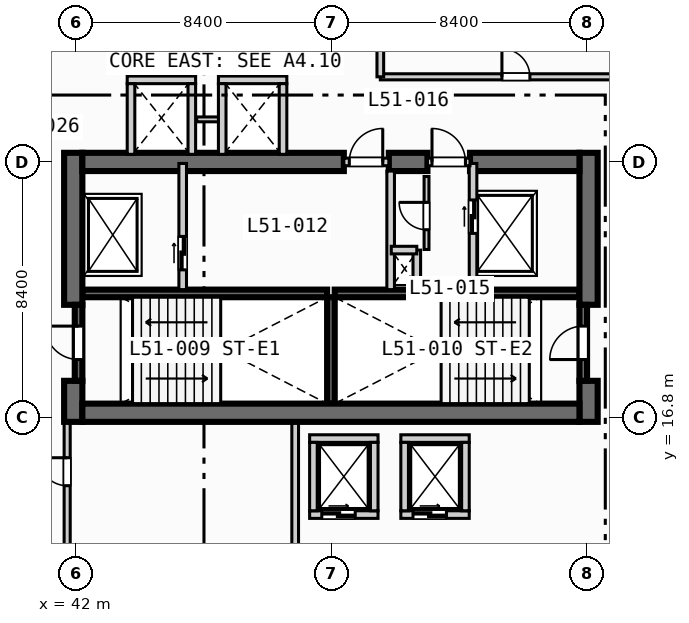
"""IFC4 building model, lengths in metres.
Left out: names, types, materials, properties, quantities, classifications, styles, units other than length and angle.
Written with IfcOpenShell. Run it as: python <this file> out.ifc"""

import sys

from ifc_helpers import new_model, si_unit, direction, frame, frame_2d, origin, place, context, subcontext, project, spatial, rectangle, extrude, element, fill, save


model = new_model("IFC4")
c1 = context("Model", 3, precision=1e-05, world=origin(), true_north=direction((0.0, 1.0)))
c2 = subcontext(c1, "Body", "Model", "MODEL_VIEW")
j1 = project(units=[si_unit("LENGTHUNIT", "METRE"), si_unit("PLANEANGLEUNIT", "RADIAN")], contexts=[c1])
p1 = place(None, origin())
s1 = spatial("IfcSite", under=j1, at=p1, CompositionType="ELEMENT")
p2 = place(p1, origin())
s2 = spatial("IfcBuilding", under=s1, at=p2, CompositionType="ELEMENT")
p3 = place(p2, frame((0.0, 0.0, 208.7)))
s3 = spatial("IfcBuildingStorey", under=s2, at=p3, CompositionType="ELEMENT", Elevation=208.7)
for number, where, z_axis, x_axis in (
    (1, (42.2, 20.875, 0.0), (0.0, 0.0, 1.0), (1.0, 0.0, 0.0)),
    (2, (50.5, 20.875, 0.0), (0.0, 0.0, 1.0), (1.0, 0.0, 0.0)),
):
    element("IfcWall", number, at=place(p3, frame(where, z_axis=z_axis, x_axis=x_axis)), inside=s3, PredefinedType="SOLIDWALL", context=c2, shape_type="SweptSolid", body=[
        extrude(rectangle(XDim=8.05, YDim=0.25, at=frame_2d((4.025, 0.0))), origin(), (0.0, 0.0, 1.0), 3.47),
    ])
p4 = place(p3, frame((50.375, 17.25, 0.0), z_axis=(0.0, 0.0, 1.0), x_axis=(0.0, 1.0, 0.0)))
e3 = element("IfcWall", 3, at=p4, inside=s3, PredefinedType="SOLIDWALL", context=c2, shape_type="SweptSolid", body=[
    extrude(rectangle(XDim=3.5, YDim=0.25, at=frame_2d((1.75, 0.0))), origin(), (0.0, 0.0, 1.0), 3.47),
])
p5 = place(p3, frame((41.9, 16.65, 0.0), z_axis=(0.0, 0.0, 1.0), x_axis=(0.0, 1.0, 0.0)))
e4 = element("IfcWall", 4, at=p5, inside=s3, PredefinedType="SHEAR", context=c2, shape_type="SweptSolid", body=[
    extrude(rectangle(XDim=1.35, YDim=0.6, at=frame_2d((0.675, 0.0))), origin(), (0.0, 0.0, 1.0), 3.47),
])
p6 = place(p3, frame((41.9, 20.5, 0.0), z_axis=(0.0, 0.0, 1.0), x_axis=(0.0, 1.0, 0.0)))
e5 = element("IfcWall", 5, at=p6, inside=s3, PredefinedType="SHEAR", context=c2, shape_type="SweptSolid", body=[
    extrude(rectangle(XDim=5.0, YDim=0.6, at=frame_2d((2.5, 0.0))), origin(), (0.0, 0.0, 1.0), 3.47),
])
p7 = place(p3, frame((58.85, 16.65, 0.0), z_axis=(0.0, 0.0, 1.0), x_axis=(0.0, 1.0, 0.0)))
e6 = element("IfcWall", 6, at=p7, inside=s3, PredefinedType="SHEAR", context=c2, shape_type="SweptSolid", body=[
    extrude(rectangle(XDim=1.35, YDim=0.6, at=frame_2d((0.675, 0.0))), origin(), (0.0, 0.0, 1.0), 3.47),
])
p8 = place(p3, frame((58.85, 20.5, 0.0), z_axis=(0.0, 0.0, 1.0), x_axis=(0.0, 1.0, 0.0)))
e7 = element("IfcWall", 7, at=p8, inside=s3, PredefinedType="SHEAR", context=c2, shape_type="SweptSolid", body=[
    extrude(rectangle(XDim=5.0, YDim=0.6, at=frame_2d((2.5, 0.0))), origin(), (0.0, 0.0, 1.0), 3.47),
])
p9 = place(p3, frame((42.2, 16.95, 0.0), z_axis=(0.0, 0.0, 1.0), x_axis=(1.0, 0.0, 0.0)))
e8 = element("IfcWall", 8, at=p9, inside=s3, PredefinedType="SHEAR", context=c2, shape_type="SweptSolid", body=[
    extrude(rectangle(XDim=16.35, YDim=0.6, at=frame_2d((8.175, 0.0))), origin(), (0.0, 0.0, 1.0), 3.47),
])
p10 = place(p3, frame((42.2, 25.2, 0.0), z_axis=(0.0, 0.0, 1.0), x_axis=(1.0, 0.0, 0.0)))
e9 = element("IfcWall", 9, at=p10, inside=s3, PredefinedType="SHEAR", context=c2, shape_type="SweptSolid", body=[
    extrude(rectangle(XDim=8.6, YDim=0.6, at=frame_2d((4.3, 0.0))), origin(), (0.0, 0.0, 1.0), 3.47),
])
p11 = place(p3, frame((52.28, 25.2, 0.0), z_axis=(0.0, 0.0, 1.0), x_axis=(1.0, 0.0, 0.0)))
e10 = element("IfcWall", 10, at=p11, inside=s3, PredefinedType="SHEAR", context=c2, shape_type="SweptSolid", body=[
    extrude(rectangle(XDim=1.27, YDim=0.6, at=frame_2d((0.635, 0.0))), origin(), (0.0, 0.0, 1.0), 3.47),
])
p12 = place(p3, frame((54.95, 25.2, 0.0), z_axis=(0.0, 0.0, 1.0), x_axis=(1.0, 0.0, 0.0)))
e11 = element("IfcWall", 11, at=p12, inside=s3, PredefinedType="SHEAR", context=c2, shape_type="SweptSolid", body=[
    extrude(rectangle(XDim=3.6, YDim=0.6, at=frame_2d((1.8, 0.0))), origin(), (0.0, 0.0, 1.0), 3.47),
])
p13 = place(p3, frame((42.075, 18.0, 0.0), z_axis=(0.0, 0.0, 1.0), x_axis=(0.0, 1.0, 0.0)))
e12 = element("IfcWall", 12, at=p13, inside=s3, PredefinedType="SOLIDWALL", context=c2, shape_type="SweptSolid", body=[
    extrude(rectangle(XDim=2.5, YDim=0.25, at=frame_2d((1.25, 0.0))), origin(), (0.0, 0.0, 1.0), 3.47),
])
p14 = place(p13, frame((0.7, 0.0, 0.0)))
e13 = element("IfcOpeningElement", 13, at=p14, cuts=e12, PredefinedType="OPENING", context=c2, shape_type="SweptSolid", body=[
    extrude(rectangle(XDim=1.1, YDim=2.15, at=frame_2d((0.55, 1.075))), frame((0.0, 0.135, 0.0), z_axis=(0.0, -1.0, 0.0), x_axis=(1.0, 0.0, 0.0)), (0.0, 0.0, 1.0), 0.27),
])
p15 = place(p3, frame((58.675, 18.0, 0.0), z_axis=(0.0, 0.0, 1.0), x_axis=(0.0, 1.0, 0.0)))
e14 = element("IfcWall", 14, at=p15, inside=s3, PredefinedType="SOLIDWALL", context=c2, shape_type="SweptSolid", body=[
    extrude(rectangle(XDim=2.5, YDim=0.25, at=frame_2d((1.25, 0.0))), origin(), (0.0, 0.0, 1.0), 3.47),
])
p16 = place(p15, frame((0.7, 0.0, 0.0)))
e15 = element("IfcOpeningElement", 15, at=p16, cuts=e14, PredefinedType="OPENING", context=c2, shape_type="SweptSolid", body=[
    extrude(rectangle(XDim=1.1, YDim=2.15, at=frame_2d((0.55, 1.075))), frame((0.0, 0.135, 0.0), z_axis=(0.0, -1.0, 0.0), x_axis=(1.0, 0.0, 0.0)), (0.0, 0.0, 1.0), 0.27),
])
p17 = place(p3, frame((45.5, 21.0, 0.0), z_axis=(0.0, 0.0, 1.0), x_axis=(0.0, 1.0, 0.0)))
e16 = element("IfcWall", 16, at=p17, inside=s3, PredefinedType="SOLIDWALL", context=c2, shape_type="SweptSolid", body=[
    extrude(rectangle(XDim=4.15, YDim=0.25, at=frame_2d((2.075, 0.0))), origin(), (0.0, 0.0, 1.0), 3.47),
])
p18 = place(p17, frame((0.65, 0.0, 0.0)))
e17 = element("IfcOpeningElement", 17, at=p18, cuts=e16, PredefinedType="OPENING", context=c2, shape_type="SweptSolid", body=[
    extrude(rectangle(XDim=1.1, YDim=2.15, at=frame_2d((0.55, 1.075))), frame((0.0, 0.135, 0.0), z_axis=(0.0, -1.0, 0.0), x_axis=(1.0, 0.0, 0.0)), (0.0, 0.0, 1.0), 0.27),
])
p19 = place(p3, frame((50.8, 25.2, 0.0), z_axis=(0.0, 0.0, 1.0), x_axis=(1.0, 0.0, 0.0)))
e18 = element("IfcWall", 18, at=p19, inside=s3, PredefinedType="SOLIDWALL", context=c2, shape_type="SweptSolid", body=[
    extrude(rectangle(XDim=1.48, YDim=0.25, at=frame_2d((0.74, 0.0))), origin(), (0.0, 0.0, 1.0), 3.47),
])
p20 = place(p19, frame((0.18, 0.0, 0.0)))
e19 = element("IfcOpeningElement", 19, at=p20, cuts=e18, PredefinedType="OPENING", context=c2, shape_type="SweptSolid", body=[
    extrude(rectangle(XDim=1.1, YDim=2.15, at=frame_2d((0.55, 1.075))), frame((0.0, 0.135, 0.0), z_axis=(0.0, -1.0, 0.0), x_axis=(1.0, 0.0, 0.0)), (0.0, 0.0, 1.0), 0.27),
])
p21 = place(p3, frame((52.34, 21.0, 0.0), z_axis=(0.0, 0.0, 1.0), x_axis=(0.0, 1.0, 0.0)))
e20 = element("IfcWall", 20, at=p21, inside=s3, PredefinedType="SOLIDWALL", context=c2, shape_type="SweptSolid", body=[
    extrude(rectangle(XDim=3.9, YDim=0.25, at=frame_2d((1.95, 0.0))), origin(), (0.0, 0.0, 1.0), 3.47),
])
p22 = place(p3, frame((55.05, 21.0, 0.0), z_axis=(0.0, 0.0, 1.0), x_axis=(0.0, 1.0, 0.0)))
e21 = element("IfcWall", 21, at=p22, inside=s3, PredefinedType="SOLIDWALL", context=c2, shape_type="SweptSolid", body=[
    extrude(rectangle(XDim=4.15, YDim=0.25, at=frame_2d((2.075, 0.0))), origin(), (0.0, 0.0, 1.0), 3.47),
])
p23 = place(p22, frame((1.85, 0.0, 0.0)))
e22 = element("IfcOpeningElement", 22, at=p23, cuts=e21, PredefinedType="OPENING", context=c2, shape_type="SweptSolid", body=[
    extrude(rectangle(XDim=1.1, YDim=2.15, at=frame_2d((0.55, 1.075))), frame((0.0, 0.135, 0.0), z_axis=(0.0, -1.0, 0.0), x_axis=(1.0, 0.0, 0.0)), (0.0, 0.0, 1.0), 0.27),
])
p24 = place(p3, frame((53.55, 25.2, 0.0), z_axis=(0.0, 0.0, 1.0), x_axis=(1.0, 0.0, 0.0)))
e23 = element("IfcWall", 23, at=p24, inside=s3, PredefinedType="SOLIDWALL", context=c2, shape_type="SweptSolid", body=[
    extrude(rectangle(XDim=1.4, YDim=0.25, at=frame_2d((0.7, 0.0))), origin(), (0.0, 0.0, 1.0), 3.47),
])
p25 = place(p24, frame((0.15, 0.0, 0.0)))
e24 = element("IfcOpeningElement", 24, at=p25, cuts=e23, PredefinedType="OPENING", context=c2, shape_type="SweptSolid", body=[
    extrude(rectangle(XDim=1.1, YDim=2.15, at=frame_2d((0.55, 1.075))), frame((0.0, 0.135, 0.0), z_axis=(0.0, -1.0, 0.0), x_axis=(1.0, 0.0, 0.0)), (0.0, 0.0, 1.0), 0.27),
])
p26 = place(p3, frame((53.2, 21.0, 0.0), z_axis=(0.0, 0.0, 1.0), x_axis=(0.0, 1.0, 0.0)))
e25 = element("IfcWall", 25, at=p26, inside=s3, PredefinedType="SOLIDWALL", context=c2, shape_type="SweptSolid", body=[
    extrude(rectangle(XDim=1.3, YDim=0.25, at=frame_2d((0.65, 0.0))), origin(), (0.0, 0.0, 1.0), 3.47),
])
p27 = place(p3, frame((52.36, 22.3, 0.0), z_axis=(0.0, 0.0, 1.0), x_axis=(1.0, 0.0, 0.0)))
e26 = element("IfcWall", 26, at=p27, inside=s3, PredefinedType="SOLIDWALL", context=c2, shape_type="SweptSolid", body=[
    extrude(rectangle(XDim=0.84, YDim=0.25, at=frame_2d((0.42, 0.0))), origin(), (0.0, 0.0, 1.0), 3.47),
])
p28 = place(p3, frame((53.52, 22.32, 0.0), z_axis=(0.0, 0.0, 1.0), x_axis=(0.0, 1.0, 0.0)))
e27 = element("IfcWall", 27, at=p28, inside=s3, PredefinedType="PARTITIONING", context=c2, shape_type="SweptSolid", body=[
    extrude(rectangle(XDim=2.4, YDim=0.16, at=frame_2d((1.2, 0.0))), origin(), (0.0, 0.0, 1.0), 3.47),
])
p29 = place(p28, frame((0.65, 0.0, 0.0)))
e28 = element("IfcOpeningElement", 28, at=p29, cuts=e27, PredefinedType="OPENING", context=c2, shape_type="SweptSolid", body=[
    extrude(rectangle(XDim=0.9, YDim=2.1, at=frame_2d((0.45, 1.05))), frame((0.0, 0.09, 0.0), z_axis=(0.0, -1.0, 0.0), x_axis=(1.0, 0.0, 0.0)), (0.0, 0.0, 1.0), 0.18),
])
p30 = place(p3, frame((49.675, 13.6, 0.0), z_axis=(0.0, 0.0, 1.0), x_axis=(1.0, 0.0, 0.0)))
e29 = element("IfcWall", 29, at=p30, inside=s3, PredefinedType="SOLIDWALL", context=c2, shape_type="SweptSolid", body=[
    extrude(rectangle(XDim=2.25, YDim=0.25, at=frame_2d((1.125, 0.0))), origin(), (0.0, 0.0, 1.0), 3.47),
])
p31 = place(p30, frame((0.4, 0.0, 0.0)))
e30 = element("IfcOpeningElement", 30, at=p31, cuts=e29, PredefinedType="OPENING", context=c2, shape_type="SweptSolid", body=[
    extrude(rectangle(XDim=1.1, YDim=2.15, at=frame_2d((0.55, 1.075))), frame((0.0, 0.135, 0.0), z_axis=(0.0, -1.0, 0.0), x_axis=(1.0, 0.0, 0.0)), (0.0, 0.0, 1.0), 0.27),
])
for number, where, z_axis, x_axis in (
    (31, (49.675, 16.1, 0.0), (0.0, 0.0, 1.0), (1.0, 0.0, 0.0)),
    (32, (49.8, 13.725, 0.0), (0.0, 0.0, 1.0), (0.0, 1.0, 0.0)),
    (33, (51.8, 13.725, 0.0), (0.0, 0.0, 1.0), (0.0, 1.0, 0.0)),
):
    element("IfcWall", number, at=place(p3, frame(where, z_axis=z_axis, x_axis=x_axis)), inside=s3, PredefinedType="SOLIDWALL", context=c2, shape_type="SweptSolid", body=[
        extrude(rectangle(XDim=2.25, YDim=0.25, at=frame_2d((1.125, 0.0))), origin(), (0.0, 0.0, 1.0), 3.47),
    ])
p32 = place(p3, frame((52.675, 13.6, 0.0), z_axis=(0.0, 0.0, 1.0), x_axis=(1.0, 0.0, 0.0)))
e34 = element("IfcWall", 34, at=p32, inside=s3, PredefinedType="SOLIDWALL", context=c2, shape_type="SweptSolid", body=[
    extrude(rectangle(XDim=2.25, YDim=0.25, at=frame_2d((1.125, 0.0))), origin(), (0.0, 0.0, 1.0), 3.47),
])
p33 = place(p32, frame((0.4, 0.0, 0.0)))
e35 = element("IfcOpeningElement", 35, at=p33, cuts=e34, PredefinedType="OPENING", context=c2, shape_type="SweptSolid", body=[
    extrude(rectangle(XDim=1.1, YDim=2.15, at=frame_2d((0.55, 1.075))), frame((0.0, 0.135, 0.0), z_axis=(0.0, -1.0, 0.0), x_axis=(1.0, 0.0, 0.0)), (0.0, 0.0, 1.0), 0.27),
])
for number, where, z_axis, x_axis in (
    (36, (52.675, 16.1, 0.0), (0.0, 0.0, 1.0), (1.0, 0.0, 0.0)),
    (37, (52.8, 13.725, 0.0), (0.0, 0.0, 1.0), (0.0, 1.0, 0.0)),
    (38, (54.8, 13.725, 0.0), (0.0, 0.0, 1.0), (0.0, 1.0, 0.0)),
    (39, (43.675, 27.9, 0.0), (0.0, 0.0, 1.0), (1.0, 0.0, 0.0)),
):
    element("IfcWall", number, at=place(p3, frame(where, z_axis=z_axis, x_axis=x_axis)), inside=s3, PredefinedType="SOLIDWALL", context=c2, shape_type="SweptSolid", body=[
        extrude(rectangle(XDim=2.25, YDim=0.25, at=frame_2d((1.125, 0.0))), origin(), (0.0, 0.0, 1.0), 3.47),
    ])
for number, where, z_axis, x_axis in (
    (40, (43.8, 25.45, 0.0), (0.0, 0.0, 1.0), (0.0, 1.0, 0.0)),
    (41, (45.8, 25.45, 0.0), (0.0, 0.0, 1.0), (0.0, 1.0, 0.0)),
):
    element("IfcWall", number, at=place(p3, frame(where, z_axis=z_axis, x_axis=x_axis)), inside=s3, PredefinedType="SOLIDWALL", context=c2, shape_type="SweptSolid", body=[
        extrude(rectangle(XDim=2.325, YDim=0.25, at=frame_2d((1.163, 0.0))), origin(), (0.0, 0.0, 1.0), 3.47),
    ])
p34 = place(p3, frame((45.96, 26.6, 0.0), z_axis=(0.0, 0.0, 1.0), x_axis=(1.0, 0.0, 0.0)))
e42 = element("IfcWall", 42, at=p34, inside=s3, PredefinedType="PARTITIONING", context=c2, shape_type="SweptSolid", body=[
    extrude(rectangle(XDim=0.88, YDim=0.16, at=frame_2d((0.44, 0.0))), origin(), (0.0, 0.0, 1.0), 3.47),
])
p35 = place(p3, frame((46.675, 27.9, 0.0), z_axis=(0.0, 0.0, 1.0), x_axis=(1.0, 0.0, 0.0)))
e43 = element("IfcWall", 43, at=p35, inside=s3, PredefinedType="SOLIDWALL", context=c2, shape_type="SweptSolid", body=[
    extrude(rectangle(XDim=2.25, YDim=0.25, at=frame_2d((1.125, 0.0))), origin(), (0.0, 0.0, 1.0), 3.47),
])
for number, where, z_axis, x_axis in (
    (44, (46.8, 25.45, 0.0), (0.0, 0.0, 1.0), (0.0, 1.0, 0.0)),
    (45, (48.8, 25.45, 0.0), (0.0, 0.0, 1.0), (0.0, 1.0, 0.0)),
):
    element("IfcWall", number, at=place(p3, frame(where, z_axis=z_axis, x_axis=x_axis)), inside=s3, PredefinedType="SOLIDWALL", context=c2, shape_type="SweptSolid", body=[
        extrude(rectangle(XDim=2.325, YDim=0.25, at=frame_2d((1.163, 0.0))), origin(), (0.0, 0.0, 1.0), 3.47),
    ])
p36 = place(p3, frame((41.7, 0.35, 0.0), z_axis=(0.0, 0.0, 1.0), x_axis=(0.0, 1.0, 0.0)))
e46 = element("IfcWall", 46, at=p36, inside=s3, PredefinedType="PARTITIONING", context=c2, shape_type="SweptSolid", body=[
    extrude(rectangle(XDim=16.25, YDim=0.2, at=frame_2d((8.125, 0.0))), origin(), (0.0, 0.0, 1.0), 2.82),
])
p37 = place(p36, frame((14.2, 0.0, 0.0)))
e47 = element("IfcOpeningElement", 47, at=p37, cuts=e46, PredefinedType="OPENING", context=c2, shape_type="SweptSolid", body=[
    extrude(rectangle(XDim=0.92, YDim=2.1, at=frame_2d((0.46, 1.05))), frame((0.0, 0.11, 0.0), z_axis=(0.0, -1.0, 0.0), x_axis=(1.0, 0.0, 0.0)), (0.0, 0.0, 1.0), 0.22),
])
p38 = place(p3, frame((49.2, 0.35, 0.0), z_axis=(0.0, 0.0, 1.0), x_axis=(0.0, 1.0, 0.0)))
e48 = element("IfcWall", 48, at=p38, inside=s3, PredefinedType="PARTITIONING", context=c2, shape_type="SweptSolid", body=[
    extrude(rectangle(XDim=16.25, YDim=0.22, at=frame_2d((8.125, 0.0))), origin(), (0.0, 0.0, 1.0), 3.47),
])
p39 = place(p3, frame((52.0, 28.0, 0.0), z_axis=(0.0, 0.0, 1.0), x_axis=(1.0, 0.0, 0.0)))
e49 = element("IfcWall", 49, at=p39, inside=s3, PredefinedType="PARTITIONING", context=c2, shape_type="SweptSolid", body=[
    extrude(rectangle(XDim=23.25, YDim=0.2, at=frame_2d((11.625, 0.0))), origin(), (0.0, 0.0, 1.0), 3.47),
])
p40 = place(p39, frame((4.0, 0.0, 0.0)))
e50 = element("IfcOpeningElement", 50, at=p40, cuts=e49, PredefinedType="OPENING", context=c2, shape_type="SweptSolid", body=[
    extrude(rectangle(XDim=0.92, YDim=2.1, at=frame_2d((0.46, 1.05))), frame((0.0, 0.11, 0.0), z_axis=(0.0, -1.0, 0.0), x_axis=(1.0, 0.0, 0.0)), (0.0, 0.0, 1.0), 0.22),
])
p41 = place(p3, frame((52.0, 28.0, 0.0), z_axis=(0.0, 0.0, 1.0), x_axis=(0.0, 1.0, 0.0)))
e51 = element("IfcWall", 51, at=p41, inside=s3, PredefinedType="PARTITIONING", context=c2, shape_type="SweptSolid", body=[
    extrude(rectangle(XDim=5.3, YDim=0.22, at=frame_2d((2.65, 0.0))), origin(), (0.0, 0.0, 1.0), 3.47),
])
p42 = place(p14, origin())
e52 = element("IfcDoor", 52, at=p42, inside=s3, OperationType="SINGLE_SWING_RIGHT", PredefinedType="DOOR", context=c2, shape_type="SweptSolid", body=[
    extrude(rectangle(XDim=1.1, YDim=2.15, at=frame_2d((0.55, 1.075))), frame((0.0, 0.025, 0.0), z_axis=(0.0, -1.0, 0.0), x_axis=(1.0, 0.0, 0.0)), (0.0, 0.0, 1.0), 0.05),
])
fill(e13, e52)
p43 = place(p16, origin())
e53 = element("IfcDoor", 53, at=p43, inside=s3, OperationType="SINGLE_SWING_LEFT", PredefinedType="DOOR", context=c2, shape_type="SweptSolid", body=[
    extrude(rectangle(XDim=1.1, YDim=2.15, at=frame_2d((0.55, 1.075))), frame((0.0, 0.025, 0.0), z_axis=(0.0, -1.0, 0.0), x_axis=(1.0, 0.0, 0.0)), (0.0, 0.0, 1.0), 0.05),
])
fill(e15, e53)
p44 = place(p18, origin())
e54 = element("IfcDoor", 54, at=p44, inside=s3, OperationType="SLIDING_TO_LEFT", PredefinedType="DOOR", context=c2, shape_type="SweptSolid", body=[
    extrude(rectangle(XDim=1.1, YDim=2.15, at=frame_2d((0.55, 1.075))), frame((0.0, 0.025, 0.0), z_axis=(0.0, -1.0, 0.0), x_axis=(1.0, 0.0, 0.0)), (0.0, 0.0, 1.0), 0.05),
])
fill(e17, e54)
p45 = place(p20, origin())
e55 = element("IfcDoor", 55, at=p45, inside=s3, OperationType="SINGLE_SWING_RIGHT", PredefinedType="DOOR", context=c2, shape_type="SweptSolid", body=[
    extrude(rectangle(XDim=1.1, YDim=2.15, at=frame_2d((0.55, 1.075))), frame((0.0, 0.025, 0.0), z_axis=(0.0, -1.0, 0.0), x_axis=(1.0, 0.0, 0.0)), (0.0, 0.0, 1.0), 0.05),
])
fill(e19, e55)
p46 = place(p23, origin())
e56 = element("IfcDoor", 56, at=p46, inside=s3, OperationType="SLIDING_TO_LEFT", PredefinedType="DOOR", context=c2, shape_type="SweptSolid", body=[
    extrude(rectangle(XDim=1.1, YDim=2.15, at=frame_2d((0.55, 1.075))), frame((0.0, 0.025, 0.0), z_axis=(0.0, -1.0, 0.0), x_axis=(1.0, 0.0, 0.0)), (0.0, 0.0, 1.0), 0.05),
])
fill(e22, e56)
p47 = place(p25, origin())
e57 = element("IfcDoor", 57, at=p47, inside=s3, OperationType="SINGLE_SWING_LEFT", PredefinedType="DOOR", context=c2, shape_type="SweptSolid", body=[
    extrude(rectangle(XDim=1.1, YDim=2.15, at=frame_2d((0.55, 1.075))), frame((0.0, 0.025, 0.0), z_axis=(0.0, -1.0, 0.0), x_axis=(1.0, 0.0, 0.0)), (0.0, 0.0, 1.0), 0.05),
])
fill(e24, e57)
p48 = place(p29, origin())
e58 = element("IfcDoor", 58, at=p48, inside=s3, OperationType="SINGLE_SWING_RIGHT", PredefinedType="DOOR", context=c2, shape_type="SweptSolid", body=[
    extrude(rectangle(XDim=0.9, YDim=2.1, at=frame_2d((0.45, 1.05))), frame((0.0, 0.025, 0.0), z_axis=(0.0, -1.0, 0.0), x_axis=(1.0, 0.0, 0.0)), (0.0, 0.0, 1.0), 0.05),
])
fill(e28, e58)
p49 = place(p31, origin())
e59 = element("IfcDoor", 59, at=p49, inside=s3, OperationType="SLIDING_TO_LEFT", PredefinedType="DOOR", context=c2, shape_type="SweptSolid", body=[
    extrude(rectangle(XDim=1.1, YDim=2.15, at=frame_2d((0.55, 1.075))), frame((0.0, 0.025, 0.0), z_axis=(0.0, -1.0, 0.0), x_axis=(1.0, 0.0, 0.0)), (0.0, 0.0, 1.0), 0.05),
])
fill(e30, e59)
p50 = place(p33, origin())
e60 = element("IfcDoor", 60, at=p50, inside=s3, OperationType="SLIDING_TO_LEFT", PredefinedType="DOOR", context=c2, shape_type="SweptSolid", body=[
    extrude(rectangle(XDim=1.1, YDim=2.15, at=frame_2d((0.55, 1.075))), frame((0.0, 0.025, 0.0), z_axis=(0.0, -1.0, 0.0), x_axis=(1.0, 0.0, 0.0)), (0.0, 0.0, 1.0), 0.05),
])
fill(e35, e60)
p51 = place(p37, origin())
e61 = element("IfcDoor", 61, at=p51, inside=s3, OperationType="SINGLE_SWING_RIGHT", PredefinedType="DOOR", context=c2, shape_type="SweptSolid", body=[
    extrude(rectangle(XDim=0.92, YDim=2.1, at=frame_2d((0.46, 1.05))), frame((0.0, 0.025, 0.0), z_axis=(0.0, -1.0, 0.0), x_axis=(1.0, 0.0, 0.0)), (0.0, 0.0, 1.0), 0.05),
])
fill(e47, e61)
p52 = place(p40, origin())
e62 = element("IfcDoor", 62, at=p52, inside=s3, OperationType="SINGLE_SWING_LEFT", PredefinedType="DOOR", context=c2, shape_type="SweptSolid", body=[
    extrude(rectangle(XDim=0.92, YDim=2.1, at=frame_2d((0.46, 1.05))), frame((0.0, 0.025, 0.0), z_axis=(0.0, -1.0, 0.0), x_axis=(1.0, 0.0, 0.0)), (0.0, 0.0, 1.0), 0.05),
])
fill(e50, e62)
save(model, sys.argv[1])
